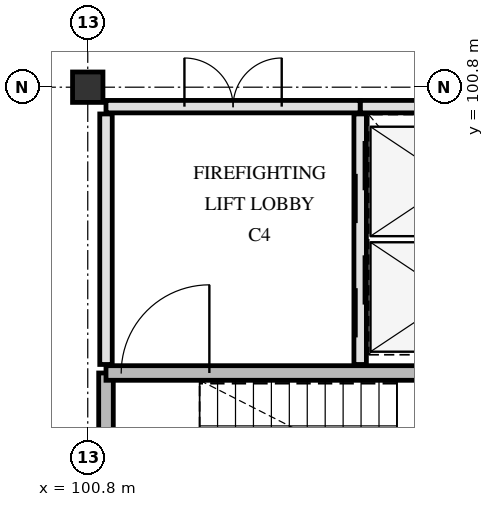
"""IFC4 building model, lengths in metres.
Left out: names, types, materials, properties, quantities, classifications, styles, units other than length and angle.
Written with IfcOpenShell. Run it as: python <this file> out.ifc"""

import sys

from ifc_helpers import new_model, si_unit, direction, frame, frame_2d, origin, origin_2d, place, context, subcontext, project, spatial, rectangle, extrude, element, fill, save


model = new_model("IFC4")
c1 = context("Model", 3, precision=1e-05, world=origin(), true_north=direction((0.0, 1.0)))
c2 = subcontext(c1, "Body", "Model", "MODEL_VIEW")
j1 = project(units=[si_unit("LENGTHUNIT", "METRE"), si_unit("PLANEANGLEUNIT", "RADIAN")], contexts=[c1])
p1 = place(None, origin())
s1 = spatial("IfcSite", under=j1, at=p1, CompositionType="ELEMENT")
p2 = place(p1, origin())
s2 = spatial("IfcBuilding", under=s1, at=p2, CompositionType="ELEMENT")
p3 = place(p2, frame((0.0, 0.0, 26.4)))
s3 = spatial("IfcBuildingStorey", under=s2, at=p3, CompositionType="ELEMENT", Elevation=26.4)
p4 = place(p3, frame((100.8, 100.8, 0.0), z_axis=(0.0, 0.0, 1.0), x_axis=(1.0, 0.0, 0.0)))
e1 = element("IfcColumn", 1, at=p4, inside=s3, PredefinedType="COLUMN", context=c2, shape_type="SweptSolid", body=[
    extrude(rectangle(XDim=0.5, YDim=0.5, at=origin_2d()), origin(), (0.0, 0.0, 1.0), 3.9),
])
p5 = place(p3, frame((101.1, 92.78, 0.0), z_axis=(0.0, 0.0, 1.0), x_axis=(0.0, 1.0, 0.0)))
e2 = element("IfcWall", 2, at=p5, inside=s3, PredefinedType="SHEAR", context=c2, shape_type="SweptSolid", body=[
    extrude(rectangle(XDim=3.32, YDim=0.24, at=frame_2d((1.66, 0.0))), origin(), (0.0, 0.0, 1.0), 3.62),
])
p6 = place(p3, frame((101.1, 96.1, 0.0), z_axis=(0.0, 0.0, 1.0), x_axis=(1.0, 0.0, 0.0)))
e3 = element("IfcWall", 3, at=p6, inside=s3, PredefinedType="SHEAR", context=c2, shape_type="SweptSolid", body=[
    extrude(rectangle(XDim=7.82, YDim=0.24, at=frame_2d((3.91, 0.0))), origin(), (0.0, 0.0, 1.0), 3.62),
])
p7 = place(p6, frame((0.25, 0.0, 0.0)))
e4 = element("IfcOpeningElement", 4, at=p7, cuts=e3, PredefinedType="OPENING", context=c2, shape_type="SweptSolid", body=[
    extrude(rectangle(XDim=1.45, YDim=2.2, at=frame_2d((0.725, 1.1))), frame((0.0, 0.13, 0.0), z_axis=(0.0, -1.0, 0.0), x_axis=(1.0, 0.0, 0.0)), (0.0, 0.0, 1.0), 0.26),
])
p8 = place(p3, frame((105.28, 96.24, 0.0), z_axis=(0.0, 0.0, 1.0), x_axis=(0.0, 1.0, 0.0)))
e5 = element("IfcWall", 5, at=p8, inside=s3, PredefinedType="PARTITIONING", context=c2, shape_type="SweptSolid", body=[
    extrude(rectangle(XDim=4.12, YDim=0.205, at=frame_2d((2.06, 0.0))), origin(), (0.0, 0.0, 1.0), 3.61),
])
p9 = place(p8, frame((0.445, 0.0, 0.0)))
e6 = element("IfcOpeningElement", 6, at=p9, cuts=e5, PredefinedType="OPENING", context=c2, shape_type="SweptSolid", body=[
    extrude(rectangle(XDim=1.35, YDim=2.2, at=frame_2d((0.675, 1.1))), frame((0.0, 0.113, 0.0), z_axis=(0.0, -1.0, 0.0), x_axis=(1.0, 0.0, 0.0)), (0.0, 0.0, 1.0), 0.225),
])
p10 = place(p8, frame((2.325, 0.0, 0.0)))
e7 = element("IfcOpeningElement", 7, at=p10, cuts=e5, PredefinedType="OPENING", context=c2, shape_type="SweptSolid", body=[
    extrude(rectangle(XDim=1.35, YDim=2.2, at=frame_2d((0.675, 1.1))), frame((0.0, 0.113, 0.0), z_axis=(0.0, -1.0, 0.0), x_axis=(1.0, 0.0, 0.0)), (0.0, 0.0, 1.0), 0.225),
])
p11 = place(p3, frame((105.28, 100.48, 0.0), z_axis=(0.0, 0.0, 1.0), x_axis=(1.0, 0.0, 0.0)))
e8 = element("IfcWall", 8, at=p11, inside=s3, PredefinedType="PARTITIONING", context=c2, shape_type="SweptSolid", body=[
    extrude(rectangle(XDim=3.57, YDim=0.205, at=frame_2d((1.785, 0.0))), origin(), (0.0, 0.0, 1.0), 3.61),
])
p12 = place(p3, frame((101.1, 96.24, 0.0), z_axis=(0.0, 0.0, 1.0), x_axis=(0.0, 1.0, 0.0)))
e9 = element("IfcWall", 9, at=p12, inside=s3, PredefinedType="PARTITIONING", context=c2, shape_type="SweptSolid", body=[
    extrude(rectangle(XDim=4.12, YDim=0.205, at=frame_2d((2.06, 0.0))), origin(), (0.0, 0.0, 1.0), 3.61),
])
p13 = place(p3, frame((101.1, 100.48, 0.0), z_axis=(0.0, 0.0, 1.0), x_axis=(1.0, 0.0, 0.0)))
e10 = element("IfcWall", 10, at=p13, inside=s3, PredefinedType="PARTITIONING", context=c2, shape_type="SweptSolid", body=[
    extrude(rectangle(XDim=4.18, YDim=0.205, at=frame_2d((2.09, 0.0))), origin(), (0.0, 0.0, 1.0), 3.61),
])
p14 = place(p13, frame((1.29, 0.0, 0.0)))
e11 = element("IfcOpeningElement", 11, at=p14, cuts=e10, PredefinedType="OPENING", context=c2, shape_type="SweptSolid", body=[
    extrude(rectangle(XDim=1.6, YDim=2.25, at=frame_2d((0.8, 1.125))), frame((0.0, 0.113, 0.0), z_axis=(0.0, -1.0, 0.0), x_axis=(1.0, 0.0, 0.0)), (0.0, 0.0, 1.0), 0.225),
])
p15 = place(p7, origin())
e12 = element("IfcDoor", 12, at=p15, inside=s3, OperationType="SINGLE_SWING_RIGHT", PredefinedType="DOOR", context=c2, shape_type="SweptSolid", body=[
    extrude(rectangle(XDim=1.45, YDim=2.2, at=frame_2d((0.725, 1.1))), frame((0.0, 0.025, 0.0), z_axis=(0.0, -1.0, 0.0), x_axis=(1.0, 0.0, 0.0)), (0.0, 0.0, 1.0), 0.05),
])
fill(e4, e12)
p16 = place(p9, origin())
e13 = element("IfcDoor", 13, at=p16, inside=s3, OperationType="SLIDING_TO_LEFT", PredefinedType="DOOR", context=c2, shape_type="SweptSolid", body=[
    extrude(rectangle(XDim=1.35, YDim=2.2, at=frame_2d((0.675, 1.1))), frame((0.0, 0.025, 0.0), z_axis=(0.0, -1.0, 0.0), x_axis=(1.0, 0.0, 0.0)), (0.0, 0.0, 1.0), 0.05),
])
fill(e6, e13)
p17 = place(p10, origin())
e14 = element("IfcDoor", 14, at=p17, inside=s3, OperationType="SLIDING_TO_LEFT", PredefinedType="DOOR", context=c2, shape_type="SweptSolid", body=[
    extrude(rectangle(XDim=1.35, YDim=2.2, at=frame_2d((0.675, 1.1))), frame((0.0, 0.025, 0.0), z_axis=(0.0, -1.0, 0.0), x_axis=(1.0, 0.0, 0.0)), (0.0, 0.0, 1.0), 0.05),
])
fill(e7, e14)
p18 = place(p14, origin())
e15 = element("IfcDoor", 15, at=p18, inside=s3, OperationType="DOUBLE_SWING_LEFT", PredefinedType="DOOR", context=c2, shape_type="SweptSolid", body=[
    extrude(rectangle(XDim=1.6, YDim=2.25, at=frame_2d((0.8, 1.125))), frame((0.0, 0.025, 0.0), z_axis=(0.0, -1.0, 0.0), x_axis=(1.0, 0.0, 0.0)), (0.0, 0.0, 1.0), 0.05),
])
fill(e11, e15)
save(model, sys.argv[1])
